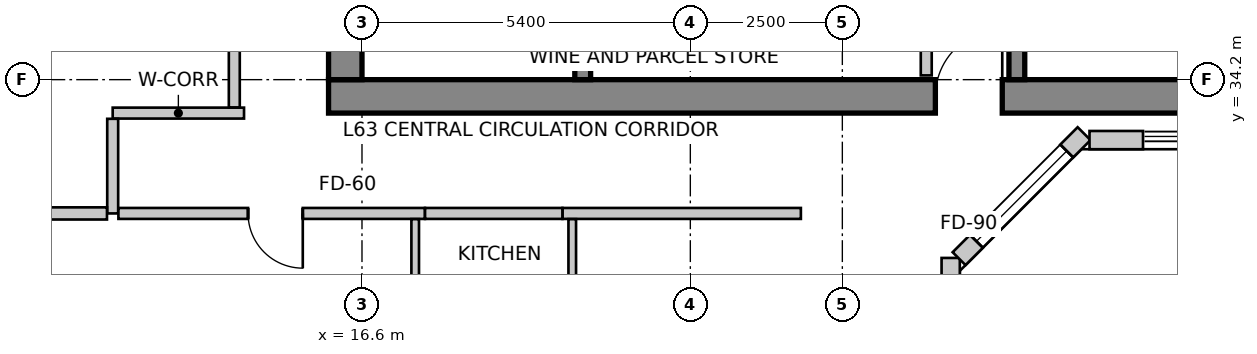
"""IFC4 building model, lengths in metres.
Left out: names, types, materials, properties, quantities, classifications, styles, units other than length and angle.
Written with IfcOpenShell. Run it as: python <this file> out.ifc"""

import sys

from ifc_helpers import new_model, si_unit, direction, frame, frame_2d, origin, place, context, subcontext, project, spatial, rectangle, extrude, source, transform, mapped, element, fill, save


model = new_model("IFC4")
c1 = context("Model", 3, precision=1e-05, world=origin(), true_north=direction((0.0, 1.0)))
c2 = subcontext(c1, "Body", "Model", "MODEL_VIEW")
j1 = project(units=[si_unit("LENGTHUNIT", "METRE"), si_unit("PLANEANGLEUNIT", "RADIAN")], contexts=[c1])
p1 = place(None, origin())
s1 = spatial("IfcSite", under=j1, at=p1, CompositionType="ELEMENT")
p2 = place(p1, origin())
s2 = spatial("IfcBuilding", under=s1, at=p2, CompositionType="ELEMENT")
p3 = place(p2, frame((0.0, 0.0, 249.3)))
s3 = spatial("IfcBuildingStorey", under=s2, at=p3, CompositionType="ELEMENT", Elevation=249.3)
p4 = place(p3, frame((16.05, 33.925, 0.0), z_axis=(0.0, 0.0, 1.0), x_axis=(1.0, 0.0, 0.0)))
e1 = element("IfcWall", 1, at=p4, inside=s3, PredefinedType="SHEAR", context=c2, shape_type="SweptSolid", body=[
    extrude(rectangle(XDim=15.5, YDim=0.55, at=frame_2d((7.75, 0.0))), origin(), (0.0, 0.0, 1.0), 3.6),
])
m1 = source(origin(), c2, "Body", "SweptSolid", [
    extrude(rectangle(XDim=1.1, YDim=2.15, at=frame_2d((0.55, 1.075))), frame((0.0, 0.285, 0.0), z_axis=(0.0, -1.0, 0.0), x_axis=(1.0, 0.0, 0.0)), (0.0, 0.0, 1.0), 0.57),
])
p5 = place(p4, frame((9.98, 0.0, 0.0)))
e2 = element("IfcOpeningElement", 2, at=p5, cuts=e1, PredefinedType="OPENING", context=c2, shape_type="MappedRepresentation", body=[
    mapped(m1, transform((0.0, 0.0, 0.0), scale=1.0)),
])
p6 = place(p3, frame((16.325, 34.2, 0.0), z_axis=(0.0, 0.0, 1.0), x_axis=(0.0, 1.0, 0.0)))
e3 = element("IfcWall", 3, at=p6, inside=s3, PredefinedType="SHEAR", context=c2, shape_type="SweptSolid", body=[
    extrude(rectangle(XDim=11.4, YDim=0.55, at=frame_2d((5.7, 0.0))), origin(), (0.0, 0.0, 1.0), 3.6),
])
p7 = place(p6, frame((7.15, 0.0, 0.0)))
e4 = element("IfcOpeningElement", 4, at=p7, cuts=e3, PredefinedType="OPENING", context=c2, shape_type="MappedRepresentation", body=[
    mapped(m1, transform((0.0, 0.0, 0.0), scale=1.0)),
])
p8 = place(p3, frame((20.23, 34.2, 0.0), z_axis=(0.0, 0.0, 1.0), x_axis=(0.0, 1.0, 0.0)))
e5 = element("IfcWall", 5, at=p8, inside=s3, PredefinedType="SHEAR", context=c2, shape_type="SweptSolid", body=[
    extrude(rectangle(XDim=9.06, YDim=0.26, at=frame_2d((4.53, 0.0))), origin(), (0.0, 0.0, 1.0), 3.6),
])
m2 = source(origin(), c2, "Body", "SweptSolid", [
    extrude(rectangle(XDim=1.1, YDim=2.15, at=frame_2d((0.55, 1.075))), frame((0.0, 0.14, 0.0), z_axis=(0.0, -1.0, 0.0), x_axis=(1.0, 0.0, 0.0)), (0.0, 0.0, 1.0), 0.28),
])
p9 = place(p8, frame((7.45, 0.0, 0.0)))
e6 = element("IfcOpeningElement", 6, at=p9, cuts=e5, PredefinedType="OPENING", context=c2, shape_type="MappedRepresentation", body=[
    mapped(m2, transform((0.0, 0.0, 0.0), scale=1.0)),
])
p10 = place(p3, frame((27.37, 34.2, 0.0), z_axis=(0.0, 0.0, 1.0), x_axis=(0.0, 1.0, 0.0)))
e7 = element("IfcWall", 7, at=p10, inside=s3, PredefinedType="SHEAR", context=c2, shape_type="SweptSolid", body=[
    extrude(rectangle(XDim=9.06, YDim=0.26, at=frame_2d((4.53, 0.0))), origin(), (0.0, 0.0, 1.0), 3.6),
])
p11 = place(p10, frame((7.45, 0.0, 0.0)))
e8 = element("IfcOpeningElement", 8, at=p11, cuts=e7, PredefinedType="OPENING", context=c2, shape_type="MappedRepresentation", body=[
    mapped(m2, transform((0.0, 0.0, 0.0), scale=1.0)),
])
p12 = place(p3, frame((26.282, 21.557, 0.0), z_axis=(0.0, 0.0, 1.0), x_axis=(0.0, 1.0, 0.0)))
e9 = element("IfcWall", 9, at=p12, inside=s3, PredefinedType="SOLIDWALL", context=c2, shape_type="SweptSolid", body=[
    extrude(rectangle(XDim=9.711, YDim=0.3, at=frame_2d((4.855, 0.0))), origin(), (0.0, 0.0, 1.0), 3.35),
])
m3 = source(origin(), c2, "Body", "SweptSolid", [
    extrude(rectangle(XDim=2.1, YDim=2.0, at=frame_2d((1.05, 1.0))), frame((0.0, 0.16, 0.0), z_axis=(0.0, -1.0, 0.0), x_axis=(1.0, 0.0, 0.0)), (0.0, 0.0, 1.0), 0.32),
])
p13 = place(p12, frame((1.538, 0.0, 0.85)))
e10 = element("IfcOpeningElement", 10, at=p13, cuts=e9, PredefinedType="OPENING", context=c2, shape_type="MappedRepresentation", body=[
    mapped(m3, transform((0.0, 0.0, 0.0), scale=1.0)),
])
m4 = source(origin(), c2, "Body", "SweptSolid", [
    extrude(rectangle(XDim=2.4, YDim=2.2, at=frame_2d((1.2, 1.1))), frame((0.0, 0.16, 0.0), z_axis=(0.0, -1.0, 0.0), x_axis=(1.0, 0.0, 0.0)), (0.0, 0.0, 1.0), 0.32),
])
p14 = place(p12, frame((5.923, 0.0, 0.85)))
e11 = element("IfcOpeningElement", 11, at=p14, cuts=e9, PredefinedType="OPENING", context=c2, shape_type="MappedRepresentation", body=[
    mapped(m4, transform((0.0, 0.0, 0.0), scale=1.0)),
])
p15 = place(p3, frame((26.42, 31.256, 0.0), z_axis=(0.0, 0.0, 1.0), x_axis=(0.707106781187, 0.707106781187, 0.0)))
e12 = element("IfcWall", 12, at=p15, inside=s3, PredefinedType="SOLIDWALL", context=c2, shape_type="SweptSolid", body=[
    extrude(rectangle(XDim=2.907, YDim=0.3, at=frame_2d((1.454, 0.0))), origin(), (0.0, 0.0, 1.0), 3.35),
])
p16 = place(p15, frame((0.404, 0.0, 0.85)))
e13 = element("IfcOpeningElement", 13, at=p16, cuts=e12, PredefinedType="OPENING", context=c2, shape_type="MappedRepresentation", body=[
    mapped(m3, transform((0.0, 0.0, 0.0), scale=1.0)),
])
p17 = place(p3, frame((28.565, 33.206, 0.0), z_axis=(0.0, 0.0, 1.0), x_axis=(1.0, 0.0, 0.0)))
e14 = element("IfcWall", 14, at=p17, inside=s3, PredefinedType="SOLIDWALL", context=c2, shape_type="SweptSolid", body=[
    extrude(rectangle(XDim=0.88, YDim=0.3, at=frame_2d((0.44, 0.0))), origin(), (0.0, 0.0, 1.0), 3.35),
])
p18 = place(p3, frame((13.269, 47.134, 0.0), z_axis=(0.0, 0.0, 1.0), x_axis=(-0.3199211297, -0.947444178182, 0.0)))
e15 = element("IfcWall", 15, at=p18, inside=s3, PredefinedType="SOLIDWALL", context=c2, shape_type="SweptSolid", body=[
    extrude(rectangle(XDim=16.132, YDim=0.3, at=frame_2d((8.066, 0.0))), origin(), (0.0, 0.0, 1.0), 3.35),
])
p19 = place(p18, frame((2.585, 0.0, 0.85)))
e16 = element("IfcOpeningElement", 16, at=p19, cuts=e15, PredefinedType="OPENING", context=c2, shape_type="MappedRepresentation", body=[
    mapped(m3, transform((0.0, 0.0, 0.0), scale=1.0)),
])
p20 = place(p18, frame((7.267, 0.0, 0.85)))
e17 = element("IfcOpeningElement", 17, at=p20, cuts=e15, PredefinedType="OPENING", context=c2, shape_type="MappedRepresentation", body=[
    mapped(m4, transform((0.0, 0.0, 0.0), scale=1.0)),
])
p21 = place(p18, frame((12.249, 0.0, 0.85)))
e18 = element("IfcOpeningElement", 18, at=p21, cuts=e15, PredefinedType="OPENING", context=c2, shape_type="MappedRepresentation", body=[
    mapped(m3, transform((0.0, 0.0, 0.0), scale=1.0)),
])
p22 = place(p3, frame((25.88, 35.956, 0.0), z_axis=(0.0, 0.0, 1.0), x_axis=(0.0, -1.0, 0.0)))
e19 = element("IfcWall", 19, at=p22, inside=s3, PredefinedType="PARTITIONING", context=c2, shape_type="SweptSolid", body=[
    extrude(rectangle(XDim=1.686, YDim=0.18, at=frame_2d((0.843, 0.0))), origin(), (0.0, 0.0, 1.0), 2.642),
])
p23 = place(p3, frame((12.5, 33.65, 0.0), z_axis=(0.0, 0.0, 1.0), x_axis=(1.0, 0.0, 0.0)))
e20 = element("IfcWall", 20, at=p23, inside=s3, PredefinedType="PARTITIONING", context=c2, shape_type="SweptSolid", body=[
    extrude(rectangle(XDim=2.16, YDim=0.18, at=frame_2d((1.08, 0.0))), origin(), (0.0, 0.0, 1.0), 3.35),
])
p24 = place(p3, frame((12.5, 32.0, 0.0), z_axis=(0.0, 0.0, 1.0), x_axis=(0.0, 1.0, 0.0)))
e21 = element("IfcWall", 21, at=p24, inside=s3, PredefinedType="PARTITIONING", context=c2, shape_type="SweptSolid", body=[
    extrude(rectangle(XDim=1.556, YDim=0.18, at=frame_2d((0.778, 0.0))), origin(), (0.0, 0.0, 1.0), 2.935),
])
p25 = place(p3, frame((23.818, 32.0, 0.0), z_axis=(0.0, 0.0, 1.0), x_axis=(-1.0, 0.0, 0.0)))
e22 = element("IfcWall", 22, at=p25, inside=s3, PredefinedType="PARTITIONING", context=c2, shape_type="SweptSolid", body=[
    extrude(rectangle(XDim=3.92, YDim=0.18, at=frame_2d((1.96, 0.0))), origin(), (0.0, 0.0, 1.0), 2.935),
])
p26 = place(p3, frame((17.635, 32.0, 0.0), z_axis=(0.0, 0.0, 1.0), x_axis=(-1.0, 0.0, 0.0)))
e23 = element("IfcWall", 23, at=p26, inside=s3, PredefinedType="PARTITIONING", context=c2, shape_type="SweptSolid", body=[
    extrude(rectangle(XDim=5.041, YDim=0.18, at=frame_2d((2.521, 0.0))), origin(), (0.0, 0.0, 1.0), 2.935),
])
m5 = source(origin(), c2, "Body", "SweptSolid", [
    extrude(rectangle(XDim=0.9, YDim=2.15, at=frame_2d((0.45, 1.075))), frame((0.0, 0.1, 0.0), z_axis=(0.0, -1.0, 0.0), x_axis=(1.0, 0.0, 0.0)), (0.0, 0.0, 1.0), 0.2),
])
p27 = place(p26, frame((2.009, 0.0, 0.0)))
e24 = element("IfcOpeningElement", 24, at=p27, cuts=e23, PredefinedType="OPENING", context=c2, shape_type="MappedRepresentation", body=[
    mapped(m5, transform((0.0, 0.0, 0.0), scale=1.0)),
])
p28 = place(p3, frame((19.896, 32.0, 0.0), z_axis=(0.0, 0.0, 1.0), x_axis=(-1.0, 0.0, 0.0)))
e25 = element("IfcWall", 25, at=p28, inside=s3, PredefinedType="PARTITIONING", context=c2, shape_type="SweptSolid", body=[
    extrude(rectangle(XDim=2.259, YDim=0.18, at=frame_2d((1.129, 0.0))), origin(), (0.0, 0.0, 1.0), 3.35),
])
p29 = place(p3, frame((14.5, 33.744, 0.0), z_axis=(0.0, 0.0, 1.0), x_axis=(0.0, 1.0, 0.0)))
e26 = element("IfcWall", 26, at=p29, inside=s3, PredefinedType="PARTITIONING", context=c2, shape_type="SweptSolid", body=[
    extrude(rectangle(XDim=12.406, YDim=0.18, at=frame_2d((6.203, 0.0))), origin(), (0.0, 0.0, 1.0), 3.35),
])
p30 = place(p29, frame((4.37, 0.0, 0.0)))
e27 = element("IfcOpeningElement", 27, at=p30, cuts=e26, PredefinedType="OPENING", context=c2, shape_type="MappedRepresentation", body=[
    mapped(m5, transform((0.0, 0.0, 0.0), scale=1.0)),
])
p31 = place(p3, frame((12.406, 32.0, 0.0), z_axis=(0.0, 0.0, 1.0), x_axis=(-1.0, 0.0, 0.0)))
e28 = element("IfcWall", 28, at=p31, inside=s3, PredefinedType="PARTITIONING", context=c2, shape_type="SweptSolid", body=[
    extrude(rectangle(XDim=4.126, YDim=0.2, at=frame_2d((2.063, 0.0))), origin(), (0.0, 0.0, 1.0), 2.642),
])
p32 = place(p3, frame((20.058, 25.032, 0.0), z_axis=(0.0, 0.0, 1.0), x_axis=(0.0, 1.0, 0.0)))
e29 = element("IfcWall", 29, at=p32, inside=s3, PredefinedType="PARTITIONING", context=c2, shape_type="SweptSolid", body=[
    extrude(rectangle(XDim=6.874, YDim=0.125, at=frame_2d((3.437, 0.0))), origin(), (0.0, 0.0, 1.0), 2.788),
])
m6 = source(origin(), c2, "Body", "SweptSolid", [
    extrude(rectangle(XDim=0.9, YDim=2.15, at=frame_2d((0.45, 1.075))), frame((0.0, 0.073, 0.0), z_axis=(0.0, -1.0, 0.0), x_axis=(1.0, 0.0, 0.0)), (0.0, 0.0, 1.0), 0.145),
])
p33 = place(p32, frame((2.927, 0.0, 0.0)))
e30 = element("IfcOpeningElement", 30, at=p33, cuts=e29, PredefinedType="OPENING", context=c2, shape_type="MappedRepresentation", body=[
    mapped(m6, transform((0.0, 0.0, 0.0), scale=1.0)),
])
p34 = place(p3, frame((17.475, 31.906, 0.0), z_axis=(0.0, 0.0, 1.0), x_axis=(0.0, -1.0, 0.0)))
e31 = element("IfcWall", 31, at=p34, inside=s3, PredefinedType="PARTITIONING", context=c2, shape_type="SweptSolid", body=[
    extrude(rectangle(XDim=6.874, YDim=0.125, at=frame_2d((3.437, 0.0))), origin(), (0.0, 0.0, 1.0), 2.788),
])
m7 = source(origin(), c2, "Body", "SweptSolid", [
    extrude(rectangle(XDim=0.85, YDim=2.15, at=frame_2d((0.425, 1.075))), frame((0.0, 0.073, 0.0), z_axis=(0.0, -1.0, 0.0), x_axis=(1.0, 0.0, 0.0)), (0.0, 0.0, 1.0), 0.145),
])
p35 = place(p34, frame((3.073, 0.0, 0.0)))
e32 = element("IfcOpeningElement", 32, at=p35, cuts=e31, PredefinedType="OPENING", context=c2, shape_type="MappedRepresentation", body=[
    mapped(m7, transform((0.0, 0.0, 0.0), scale=1.0)),
])
m8 = source(origin(), c2, "Body", "SweptSolid", [
    extrude(rectangle(XDim=2.1, YDim=2.0, at=frame_2d((1.05, 1.0))), frame((0.0, -0.015, 0.0), z_axis=(0.0, -1.0, 0.0), x_axis=(1.0, 0.0, 0.0)), (0.0, 0.0, 1.0), 0.06),
])
p36 = place(p16, origin())
e33 = element("IfcWindow", 33, at=p36, inside=s3, PartitioningType="SINGLE_PANEL", PredefinedType="WINDOW", context=c2, shape_type="MappedRepresentation", body=[
    mapped(m8, transform((0.0, 0.0, 0.0), scale=1.0)),
])
fill(e13, e33)
m9 = source(origin(), c2, "Body", "SweptSolid", [
    extrude(rectangle(XDim=1.1, YDim=2.15, at=frame_2d((0.55, 1.075))), frame((0.0, 0.025, 0.0), z_axis=(0.0, -1.0, 0.0), x_axis=(1.0, 0.0, 0.0)), (0.0, 0.0, 1.0), 0.05),
])
p37 = place(p5, origin())
e34 = element("IfcDoor", 34, at=p37, inside=s3, OperationType="SINGLE_SWING_RIGHT", PredefinedType="DOOR", context=c2, shape_type="MappedRepresentation", body=[
    mapped(m9, transform((0.0, 0.0, 0.0), scale=1.0)),
])
fill(e2, e34)
m10 = source(origin(), c2, "Body", "SweptSolid", [
    extrude(rectangle(XDim=0.9, YDim=2.15, at=frame_2d((0.45, 1.075))), frame((0.0, 0.025, 0.0), z_axis=(0.0, -1.0, 0.0), x_axis=(1.0, 0.0, 0.0)), (0.0, 0.0, 1.0), 0.05),
])
p38 = place(p27, origin())
e35 = element("IfcDoor", 35, at=p38, inside=s3, OperationType="SINGLE_SWING_LEFT", PredefinedType="DOOR", context=c2, shape_type="MappedRepresentation", body=[
    mapped(m10, transform((0.0, 0.0, 0.0), scale=1.0)),
])
fill(e24, e35)
save(model, sys.argv[1])
